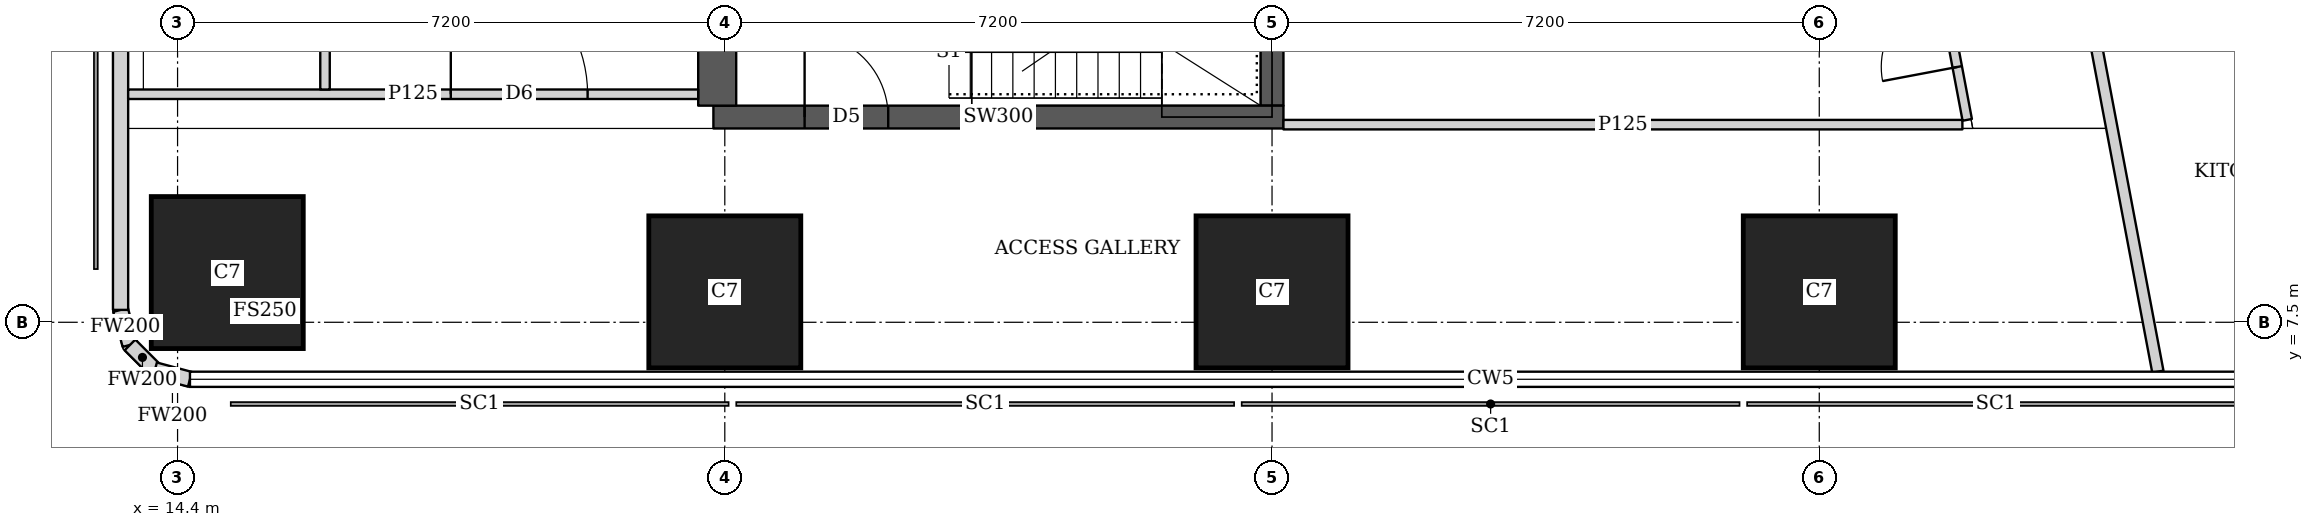
"""IFC4 building model, lengths in metres.
Left out: names, types, materials, properties, quantities, classifications, styles, units other than length and angle.
Written with IfcOpenShell. Run it as: python <this file> out.ifc"""

import sys

from ifc_helpers import new_model, si_unit, direction, frame, frame_2d, origin, origin_2d, place, context, subcontext, project, spatial, rectangle, extrude, element, fill, save


model = new_model("IFC4")
c1 = context("Model", 3, precision=1e-05, world=origin(), true_north=direction((0.0, 1.0)))
c2 = subcontext(c1, "Body", "Model", "MODEL_VIEW")
j1 = project(units=[si_unit("LENGTHUNIT", "METRE"), si_unit("PLANEANGLEUNIT", "RADIAN")], contexts=[c1])
p1 = place(None, origin())
s1 = spatial("IfcSite", under=j1, at=p1, CompositionType="ELEMENT")
p2 = place(p1, origin())
s2 = spatial("IfcBuilding", under=s1, at=p2, CompositionType="ELEMENT")
p3 = place(p2, frame((0.0, 0.0, 259.1)))
s3 = spatial("IfcBuildingStorey", under=s2, at=p3, CompositionType="ELEMENT", Elevation=259.1)
for number, where, z_axis, x_axis in (
    (1, (15.054, 8.154, 0.0), (0.0, 0.0, 1.0), (1.0, 0.0, 0.0)),
    (2, (21.6, 7.9, 0.0), (0.0, 0.0, 1.0), (1.0, 0.0, 0.0)),
    (3, (28.8, 7.9, 0.0), (0.0, 0.0, 1.0), (1.0, 0.0, 0.0)),
    (4, (36.0, 7.9, 0.0), (0.0, 0.0, 1.0), (1.0, 0.0, 0.0)),
):
    element("IfcColumn", number, at=place(p3, frame(where, z_axis=z_axis, x_axis=x_axis)), inside=s3, PredefinedType="COLUMN", context=c2, shape_type="SweptSolid", body=[
        extrude(rectangle(XDim=2.0, YDim=2.0, at=origin_2d()), origin(), (0.0, 0.0, 1.0), 3.75),
    ])
p4 = place(p3, frame((21.45, 10.2, 0.0), z_axis=(0.0, 0.0, 1.0), x_axis=(1.0, 0.0, 0.0)))
e5 = element("IfcWall", 5, at=p4, inside=s3, PredefinedType="SHEAR", context=c2, shape_type="SweptSolid", body=[
    extrude(rectangle(XDim=7.5, YDim=0.3, at=frame_2d((3.75, 0.0))), origin(), (0.0, 0.0, 1.0), 3.75),
])
p5 = place(p4, frame((1.2, 0.0, 0.0)))
e6 = element("IfcOpeningElement", 6, at=p5, cuts=e5, PredefinedType="OPENING", context=c2, shape_type="SweptSolid", body=[
    extrude(rectangle(XDim=1.1, YDim=2.1, at=frame_2d((0.55, 1.05))), frame((0.0, 0.16, 0.0), z_axis=(0.0, -1.0, 0.0), x_axis=(1.0, 0.0, 0.0)), (0.0, 0.0, 1.0), 0.32),
])
p6 = place(p3, frame((21.5, 10.35, 0.0), z_axis=(0.0, 0.0, 1.0), x_axis=(0.0, 1.0, 0.0)))
e7 = element("IfcWall", 7, at=p6, inside=s3, PredefinedType="SHEAR", context=c2, shape_type="SweptSolid", body=[
    extrude(rectangle(XDim=4.2, YDim=0.5, at=frame_2d((2.1, 0.0))), origin(), (0.0, 0.0, 1.0), 3.75),
])
p7 = place(p3, frame((28.8, 10.35, 0.0), z_axis=(0.0, 0.0, 1.0), x_axis=(0.0, 1.0, 0.0)))
e8 = element("IfcWall", 8, at=p7, inside=s3, PredefinedType="SHEAR", context=c2, shape_type="SweptSolid", body=[
    extrude(rectangle(XDim=4.2, YDim=0.3, at=frame_2d((2.1, 0.0))), origin(), (0.0, 0.0, 1.0), 3.75),
])
p8 = place(p3, frame((13.65, 43.037, 0.0), z_axis=(0.0, 0.0, 1.0), x_axis=(0.0, -1.0, 0.0)))
e9 = element("IfcWall", 9, at=p8, inside=s3, PredefinedType="SOLIDWALL", context=c2, shape_type="SweptSolid", body=[
    extrude(rectangle(XDim=35.374, YDim=0.2, at=frame_2d((17.687, 0.0))), origin(), (0.0, 0.0, 1.0), 3.5),
])
p9 = place(p8, frame((1.959, 0.0, 0.9)))
e10 = element("IfcOpeningElement", 10, at=p9, cuts=e9, PredefinedType="OPENING", context=c2, shape_type="SweptSolid", body=[
    extrude(rectangle(XDim=1.8, YDim=1.5, at=frame_2d((0.9, 0.75))), frame((0.0, 0.11, 0.0), z_axis=(0.0, -1.0, 0.0), x_axis=(1.0, 0.0, 0.0)), (0.0, 0.0, 1.0), 0.22),
])
p10 = place(p3, frame((13.65, 7.663, 0.0), z_axis=(0.0, 0.0, 1.0), x_axis=(0.259698463175, -0.965689757751, 0.0)))
e11 = element("IfcWall", 11, at=p10, inside=s3, PredefinedType="SOLIDWALL", context=c2, shape_type="SweptSolid", body=[
    extrude(rectangle(XDim=0.478, YDim=0.2, at=frame_2d((0.239, 0.0))), origin(), (0.0, 0.0, 1.0), 3.5),
])
p11 = place(p3, frame((13.774, 7.202, 0.0), z_axis=(0.0, 0.0, 1.0), x_axis=(0.707369890659, -0.706843573776, 0.0)))
e12 = element("IfcWall", 12, at=p11, inside=s3, PredefinedType="SOLIDWALL", context=c2, shape_type="SweptSolid", body=[
    extrude(rectangle(XDim=0.464, YDim=0.2, at=frame_2d((0.232, 0.0))), origin(), (0.0, 0.0, 1.0), 3.5),
])
p12 = place(p3, frame((14.102, 6.874, 0.0), z_axis=(0.0, 0.0, 1.0), x_axis=(0.965655254015, -0.259826731483, 0.0)))
e13 = element("IfcWall", 13, at=p12, inside=s3, PredefinedType="SOLIDWALL", context=c2, shape_type="SweptSolid", body=[
    extrude(rectangle(XDim=0.477, YDim=0.2, at=frame_2d((0.239, 0.0))), origin(), (0.0, 0.0, 1.0), 3.5),
])
p13 = place(p3, frame((33.781, 42.186, 0.0), z_axis=(0.0, 0.0, 1.0), x_axis=(0.185593518645, -0.9826266055, 0.0)))
e14 = element("IfcWall", 14, at=p13, inside=s3, PredefinedType="SOLIDWALL", context=c2, shape_type="SweptSolid", body=[
    extrude(rectangle(XDim=35.961, YDim=0.15, at=frame_2d((17.98, 0.0))), origin(), (0.0, 0.0, 1.0), 2.5),
])
p14 = place(p13, frame((7.183, 0.0, 0.0)))
e15 = element("IfcOpeningElement", 15, at=p14, cuts=e14, PredefinedType="OPENING", context=c2, shape_type="SweptSolid", body=[
    extrude(rectangle(XDim=1.0, YDim=2.1, at=frame_2d((0.5, 1.05))), frame((0.0, 0.085, 0.0), z_axis=(0.0, -1.0, 0.0), x_axis=(1.0, 0.0, 0.0)), (0.0, 0.0, 1.0), 0.17),
])
p15 = place(p13, frame((11.76, 0.0, 0.0)))
e16 = element("IfcOpeningElement", 16, at=p15, cuts=e14, PredefinedType="OPENING", context=c2, shape_type="SweptSolid", body=[
    extrude(rectangle(XDim=1.0, YDim=2.1, at=frame_2d((0.5, 1.05))), frame((0.0, 0.085, 0.0), z_axis=(0.0, -1.0, 0.0), x_axis=(1.0, 0.0, 0.0)), (0.0, 0.0, 1.0), 0.17),
])
p16 = place(p13, frame((23.863, 0.0, 0.0)))
e17 = element("IfcOpeningElement", 17, at=p16, cuts=e14, PredefinedType="OPENING", context=c2, shape_type="SweptSolid", body=[
    extrude(rectangle(XDim=1.0, YDim=2.1, at=frame_2d((0.5, 1.05))), frame((0.0, 0.085, 0.0), z_axis=(0.0, -1.0, 0.0), x_axis=(1.0, 0.0, 0.0)), (0.0, 0.0, 1.0), 0.17),
])
p17 = place(p13, frame((30.502, 0.0, 0.0)))
e18 = element("IfcOpeningElement", 18, at=p17, cuts=e14, PredefinedType="OPENING", context=c2, shape_type="SweptSolid", body=[
    extrude(rectangle(XDim=1.0, YDim=2.1, at=frame_2d((0.5, 1.05))), frame((0.0, 0.085, 0.0), z_axis=(0.0, -1.0, 0.0), x_axis=(1.0, 0.0, 0.0)), (0.0, 0.0, 1.0), 0.17),
])
p18 = place(p3, frame((13.75, 10.5, 0.0), z_axis=(0.0, 0.0, 1.0), x_axis=(1.0, 0.0, 0.0)))
e19 = element("IfcWall", 19, at=p18, inside=s3, PredefinedType="PARTITIONING", context=c2, shape_type="SweptSolid", body=[
    extrude(rectangle(XDim=7.5, YDim=0.125, at=frame_2d((3.75, 0.0))), origin(), (0.0, 0.0, 1.0), 3.5),
])
p19 = place(p18, frame((4.245, 0.0, 0.0)))
e20 = element("IfcOpeningElement", 20, at=p19, cuts=e19, PredefinedType="OPENING", context=c2, shape_type="SweptSolid", body=[
    extrude(rectangle(XDim=1.8, YDim=2.1, at=frame_2d((0.9, 1.05))), frame((0.0, 0.073, 0.0), z_axis=(0.0, -1.0, 0.0), x_axis=(1.0, 0.0, 0.0)), (0.0, 0.0, 1.0), 0.145),
])
p20 = place(p3, frame((16.34, 10.562, 0.0), z_axis=(0.0, 0.0, 1.0), x_axis=(0.0, 1.0, 0.0)))
e21 = element("IfcWall", 21, at=p20, inside=s3, PredefinedType="PARTITIONING", context=c2, shape_type="SweptSolid", body=[
    extrude(rectangle(XDim=3.988, YDim=0.125, at=frame_2d((1.994, 0.0))), origin(), (0.0, 0.0, 1.0), 3.5),
])
p21 = place(p20, frame((1.438, 0.0, 0.0)))
e22 = element("IfcOpeningElement", 22, at=p21, cuts=e21, PredefinedType="OPENING", context=c2, shape_type="SweptSolid", body=[
    extrude(rectangle(XDim=1.0, YDim=2.1, at=frame_2d((0.5, 1.05))), frame((0.0, 0.073, 0.0), z_axis=(0.0, -1.0, 0.0), x_axis=(1.0, 0.0, 0.0)), (0.0, 0.0, 1.0), 0.145),
])
p22 = place(p3, frame((28.95, 10.1, 0.0), z_axis=(0.0, 0.0, 1.0), x_axis=(1.0, 0.0, 0.0)))
e23 = element("IfcWall", 23, at=p22, inside=s3, PredefinedType="PARTITIONING", context=c2, shape_type="SweptSolid", body=[
    extrude(rectangle(XDim=8.933, YDim=0.125, at=frame_2d((4.467, 0.0))), origin(), (0.0, 0.0, 1.0), 3.5),
])
p23 = place(p3, frame((37.947, 10.163, 0.0), z_axis=(0.0, 0.0, 1.0), x_axis=(-0.185589250699, 0.982627411599, 0.0)))
e24 = element("IfcWall", 24, at=p23, inside=s3, PredefinedType="PARTITIONING", context=c2, shape_type="SweptSolid", body=[
    extrude(rectangle(XDim=12.555, YDim=0.125, at=frame_2d((6.277, 0.0))), origin(), (0.0, 0.0, 1.0), 2.5),
])
p24 = place(p23, frame((0.708, 0.0, 0.0)))
e25 = element("IfcOpeningElement", 25, at=p24, cuts=e24, PredefinedType="OPENING", context=c2, shape_type="SweptSolid", body=[
    extrude(rectangle(XDim=1.0, YDim=2.1, at=frame_2d((0.5, 1.05))), frame((0.0, 0.073, 0.0), z_axis=(0.0, -1.0, 0.0), x_axis=(1.0, 0.0, 0.0)), (0.0, 0.0, 1.0), 0.145),
])
p25 = place(p23, frame((5.9, 0.0, 0.0)))
e26 = element("IfcOpeningElement", 26, at=p25, cuts=e24, PredefinedType="OPENING", context=c2, shape_type="SweptSolid", body=[
    extrude(rectangle(XDim=1.0, YDim=2.1, at=frame_2d((0.5, 1.05))), frame((0.0, 0.073, 0.0), z_axis=(0.0, -1.0, 0.0), x_axis=(1.0, 0.0, 0.0)), (0.0, 0.0, 1.0), 0.145),
])
p26 = place(p23, frame((9.562, 0.0, 0.0)))
e27 = element("IfcOpeningElement", 27, at=p26, cuts=e24, PredefinedType="OPENING", context=c2, shape_type="SweptSolid", body=[
    extrude(rectangle(XDim=1.0, YDim=2.1, at=frame_2d((0.5, 1.05))), frame((0.0, 0.073, 0.0), z_axis=(0.0, -1.0, 0.0), x_axis=(1.0, 0.0, 0.0)), (0.0, 0.0, 1.0), 0.145),
])
p27 = place(p19, origin())
e28 = element("IfcDoor", 28, at=p27, inside=s3, OperationType="DOUBLE_DOOR_SINGLE_SWING", PredefinedType="DOOR", context=c2, shape_type="SweptSolid", body=[
    extrude(rectangle(XDim=1.8, YDim=2.1, at=frame_2d((0.9, 1.05))), frame((0.0, 0.025, 0.0), z_axis=(0.0, -1.0, 0.0), x_axis=(1.0, 0.0, 0.0)), (0.0, 0.0, 1.0), 0.05),
])
fill(e20, e28)
p28 = place(p24, origin())
e29 = element("IfcDoor", 29, at=p28, inside=s3, OperationType="SINGLE_SWING_LEFT", PredefinedType="DOOR", context=c2, shape_type="SweptSolid", body=[
    extrude(rectangle(XDim=1.0, YDim=2.1, at=frame_2d((0.5, 1.05))), frame((0.0, 0.025, 0.0), z_axis=(0.0, -1.0, 0.0), x_axis=(1.0, 0.0, 0.0)), (0.0, 0.0, 1.0), 0.05),
])
fill(e25, e29)
p29 = place(p5, origin())
e30 = element("IfcDoor", 30, at=p29, inside=s3, OperationType="SINGLE_SWING_LEFT", PredefinedType="DOOR", context=c2, shape_type="SweptSolid", body=[
    extrude(rectangle(XDim=1.1, YDim=2.1, at=frame_2d((0.55, 1.05))), frame((0.0, 0.025, 0.0), z_axis=(0.0, -1.0, 0.0), x_axis=(1.0, 0.0, 0.0)), (0.0, 0.0, 1.0), 0.05),
])
fill(e6, e30)
save(model, sys.argv[1])
